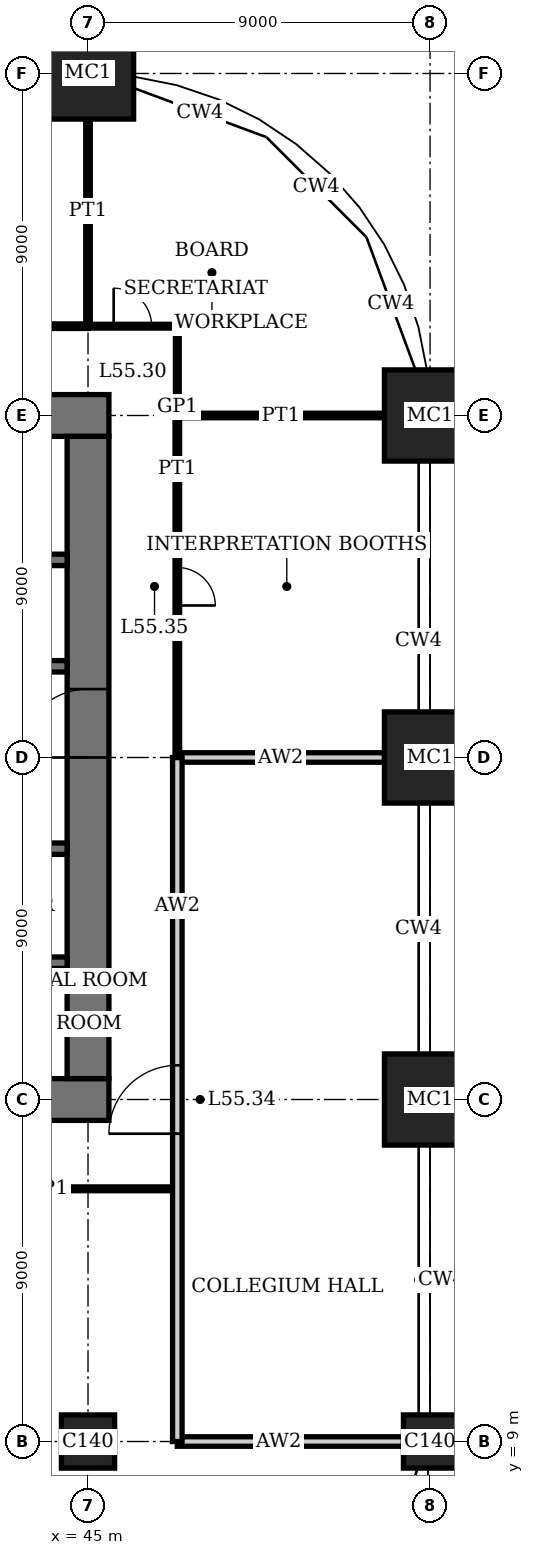
"""IFC4 building model, lengths in metres.
Left out: names, types, materials, properties, quantities, classifications, styles, units other than length and angle.
Written with IfcOpenShell. Run it as: python <this file> out.ifc"""

import sys

from ifc_helpers import new_model, si_unit, direction, frame, frame_2d, origin, origin_2d, place, context, subcontext, project, spatial, rectangle, extrude, element, fill, save


model = new_model("IFC4")
c1 = context("Model", 3, precision=1e-05, world=origin(), true_north=direction((0.0, 1.0)))
c2 = subcontext(c1, "Body", "Model", "MODEL_VIEW")
j1 = project(units=[si_unit("LENGTHUNIT", "METRE"), si_unit("PLANEANGLEUNIT", "RADIAN")], contexts=[c1])
p1 = place(None, origin())
s1 = spatial("IfcSite", under=j1, at=p1, CompositionType="ELEMENT")
p2 = place(p1, origin())
s2 = spatial("IfcBuilding", under=s1, at=p2, CompositionType="ELEMENT")
p3 = place(p2, frame((0.0, 0.0, 226.2)))
s3 = spatial("IfcBuildingStorey", under=s2, at=p3, CompositionType="ELEMENT", Elevation=226.2)
p4 = place(p3, frame((45.0, 9.0, 0.0), z_axis=(0.0, 0.0, 1.0), x_axis=(1.0, 0.0, 0.0)))
e1 = element("IfcColumn", 1, at=p4, inside=s3, PredefinedType="COLUMN", context=c2, shape_type="SweptSolid", body=[
    extrude(rectangle(XDim=1.4, YDim=1.4, at=origin_2d()), origin(), (0.0, 0.0, 1.0), 4.0),
])
p5 = place(p3, frame((45.0, 45.0, 0.0), z_axis=(0.0, 0.0, 1.0), x_axis=(1.0, 0.0, 0.0)))
e2 = element("IfcColumn", 2, at=p5, inside=s3, PredefinedType="COLUMN", context=c2, shape_type="SweptSolid", body=[
    extrude(rectangle(XDim=2.4, YDim=2.4, at=origin_2d()), origin(), (0.0, 0.0, 1.0), 4.0),
])
p6 = place(p3, frame((54.0, 9.0, 0.0), z_axis=(0.0, 0.0, 1.0), x_axis=(1.0, 0.0, 0.0)))
e3 = element("IfcColumn", 3, at=p6, inside=s3, PredefinedType="COLUMN", context=c2, shape_type="SweptSolid", body=[
    extrude(rectangle(XDim=1.4, YDim=1.4, at=origin_2d()), origin(), (0.0, 0.0, 1.0), 4.0),
])
for number, where, z_axis, x_axis in (
    (4, (54.0, 18.0, 0.0), (0.0, 0.0, 1.0), (1.0, 0.0, 0.0)),
    (5, (54.0, 27.0, 0.0), (0.0, 0.0, 1.0), (1.0, 0.0, 0.0)),
    (6, (54.0, 36.0, 0.0), (0.0, 0.0, 1.0), (1.0, 0.0, 0.0)),
):
    element("IfcColumn", number, at=place(p3, frame(where, z_axis=z_axis, x_axis=x_axis)), inside=s3, PredefinedType="COLUMN", context=c2, shape_type="SweptSolid", body=[
        extrude(rectangle(XDim=2.4, YDim=2.4, at=origin_2d()), origin(), (0.0, 0.0, 1.0), 4.0),
    ])
p7 = place(p3, frame((17.45, 18.0, 0.0), z_axis=(0.0, 0.0, 1.0), x_axis=(1.0, 0.0, 0.0)))
e7 = element("IfcWall", 7, at=p7, inside=s3, PredefinedType="SHEAR", context=c2, shape_type="SweptSolid", body=[
    extrude(rectangle(XDim=28.1, YDim=1.1, at=frame_2d((14.05, 0.0))), origin(), (0.0, 0.0, 1.0), 4.0),
])
p8 = place(p7, frame((11.55, 0.0, 0.0)))
e8 = element("IfcOpeningElement", 8, at=p8, cuts=e7, PredefinedType="OPENING", context=c2, shape_type="SweptSolid", body=[
    extrude(rectangle(XDim=1.0, YDim=2.4, at=frame_2d((0.5, 1.2))), frame((0.0, 0.56, 0.0), z_axis=(0.0, -1.0, 0.0), x_axis=(1.0, 0.0, 0.0)), (0.0, 0.0, 1.0), 1.12),
])
p9 = place(p7, frame((16.55, 0.0, 0.0)))
e9 = element("IfcOpeningElement", 9, at=p9, cuts=e7, PredefinedType="OPENING", context=c2, shape_type="SweptSolid", body=[
    extrude(rectangle(XDim=1.0, YDim=2.4, at=frame_2d((0.5, 1.2))), frame((0.0, 0.56, 0.0), z_axis=(0.0, -1.0, 0.0), x_axis=(1.0, 0.0, 0.0)), (0.0, 0.0, 1.0), 1.12),
])
p10 = place(p7, frame((20.0, 0.0, 0.0)))
e10 = element("IfcOpeningElement", 10, at=p10, cuts=e7, PredefinedType="OPENING", context=c2, shape_type="SweptSolid", body=[
    extrude(rectangle(XDim=1.1, YDim=2.4, at=frame_2d((0.55, 1.2))), frame((0.0, 0.56, 0.0), z_axis=(0.0, -1.0, 0.0), x_axis=(1.0, 0.0, 0.0)), (0.0, 0.0, 1.0), 1.12),
])
p11 = place(p7, frame((24.05, 0.0, 0.0)))
e11 = element("IfcOpeningElement", 11, at=p11, cuts=e7, PredefinedType="OPENING", context=c2, shape_type="SweptSolid", body=[
    extrude(rectangle(XDim=1.0, YDim=2.4, at=frame_2d((0.5, 1.2))), frame((0.0, 0.56, 0.0), z_axis=(0.0, -1.0, 0.0), x_axis=(1.0, 0.0, 0.0)), (0.0, 0.0, 1.0), 1.12),
])
p12 = place(p3, frame((45.55, 36.0, 0.0), z_axis=(0.0, 0.0, 1.0), x_axis=(-1.0, 0.0, 0.0)))
e12 = element("IfcWall", 12, at=p12, inside=s3, PredefinedType="SHEAR", context=c2, shape_type="SweptSolid", body=[
    extrude(rectangle(XDim=28.1, YDim=1.1, at=frame_2d((14.05, 0.0))), origin(), (0.0, 0.0, 1.0), 4.0),
])
p13 = place(p12, frame((11.55, 0.0, 0.0)))
e13 = element("IfcOpeningElement", 13, at=p13, cuts=e12, PredefinedType="OPENING", context=c2, shape_type="SweptSolid", body=[
    extrude(rectangle(XDim=1.0, YDim=2.4, at=frame_2d((0.5, 1.2))), frame((0.0, 0.56, 0.0), z_axis=(0.0, -1.0, 0.0), x_axis=(1.0, 0.0, 0.0)), (0.0, 0.0, 1.0), 1.12),
])
p14 = place(p12, frame((16.55, 0.0, 0.0)))
e14 = element("IfcOpeningElement", 14, at=p14, cuts=e12, PredefinedType="OPENING", context=c2, shape_type="SweptSolid", body=[
    extrude(rectangle(XDim=1.0, YDim=2.4, at=frame_2d((0.5, 1.2))), frame((0.0, 0.56, 0.0), z_axis=(0.0, -1.0, 0.0), x_axis=(1.0, 0.0, 0.0)), (0.0, 0.0, 1.0), 1.12),
])
p15 = place(p12, frame((20.0, 0.0, 0.0)))
e15 = element("IfcOpeningElement", 15, at=p15, cuts=e12, PredefinedType="OPENING", context=c2, shape_type="SweptSolid", body=[
    extrude(rectangle(XDim=1.1, YDim=2.4, at=frame_2d((0.55, 1.2))), frame((0.0, 0.56, 0.0), z_axis=(0.0, -1.0, 0.0), x_axis=(1.0, 0.0, 0.0)), (0.0, 0.0, 1.0), 1.12),
])
p16 = place(p12, frame((24.05, 0.0, 0.0)))
e16 = element("IfcOpeningElement", 16, at=p16, cuts=e12, PredefinedType="OPENING", context=c2, shape_type="SweptSolid", body=[
    extrude(rectangle(XDim=1.0, YDim=2.4, at=frame_2d((0.5, 1.2))), frame((0.0, 0.56, 0.0), z_axis=(0.0, -1.0, 0.0), x_axis=(1.0, 0.0, 0.0)), (0.0, 0.0, 1.0), 1.12),
])
p17 = place(p3, frame((45.0, 18.55, 0.0), z_axis=(0.0, 0.0, 1.0), x_axis=(0.0, 1.0, 0.0)))
e17 = element("IfcWall", 17, at=p17, inside=s3, PredefinedType="SHEAR", context=c2, shape_type="SweptSolid", body=[
    extrude(rectangle(XDim=16.9, YDim=1.1, at=frame_2d((8.45, 0.0))), origin(), (0.0, 0.0, 1.0), 4.0),
])
p18 = place(p17, frame((8.45, 0.0, 0.0)))
e18 = element("IfcOpeningElement", 18, at=p18, cuts=e17, PredefinedType="OPENING", context=c2, shape_type="SweptSolid", body=[
    extrude(rectangle(XDim=1.8, YDim=2.4, at=frame_2d((0.9, 1.2))), frame((0.0, 0.56, 0.0), z_axis=(0.0, -1.0, 0.0), x_axis=(1.0, 0.0, 0.0)), (0.0, 0.0, 1.0), 1.12),
])
p19 = place(p3, frame((36.15, 32.2, 0.0), z_axis=(0.0, 0.0, 1.0), x_axis=(1.0, 0.0, 0.0)))
e19 = element("IfcWall", 19, at=p19, inside=s3, PredefinedType="SHEAR", context=c2, shape_type="SweptSolid", body=[
    extrude(rectangle(XDim=8.3, YDim=0.3, at=frame_2d((4.15, 0.0))), origin(), (0.0, 0.0, 1.0), 4.0),
])
p20 = place(p19, frame((0.45, 0.0, 0.0)))
e20 = element("IfcOpeningElement", 20, at=p20, cuts=e19, PredefinedType="OPENING", context=c2, shape_type="SweptSolid", body=[
    extrude(rectangle(XDim=1.0, YDim=2.4, at=frame_2d((0.5, 1.2))), frame((0.0, 0.16, 0.0), z_axis=(0.0, -1.0, 0.0), x_axis=(1.0, 0.0, 0.0)), (0.0, 0.0, 1.0), 0.32),
])
p21 = place(p3, frame((18.55, 24.6, 0.0), z_axis=(0.0, 0.0, 1.0), x_axis=(1.0, 0.0, 0.0)))
e21 = element("IfcWall", 21, at=p21, inside=s3, PredefinedType="SHEAR", context=c2, shape_type="SweptSolid", body=[
    extrude(rectangle(XDim=25.9, YDim=0.3, at=frame_2d((12.95, 0.0))), origin(), (0.0, 0.0, 1.0), 4.0),
])
p22 = place(p21, frame((4.95, 0.0, 0.0)))
e22 = element("IfcOpeningElement", 22, at=p22, cuts=e21, PredefinedType="OPENING", context=c2, shape_type="SweptSolid", body=[
    extrude(rectangle(XDim=1.0, YDim=2.4, at=frame_2d((0.5, 1.2))), frame((0.0, 0.16, 0.0), z_axis=(0.0, -1.0, 0.0), x_axis=(1.0, 0.0, 0.0)), (0.0, 0.0, 1.0), 0.32),
])
p23 = place(p21, frame((24.5, 0.0, 0.0)))
e23 = element("IfcOpeningElement", 23, at=p23, cuts=e21, PredefinedType="OPENING", context=c2, shape_type="SweptSolid", body=[
    extrude(rectangle(XDim=0.9, YDim=2.1, at=frame_2d((0.45, 1.05))), frame((0.0, 0.16, 0.0), z_axis=(0.0, -1.0, 0.0), x_axis=(1.0, 0.0, 0.0)), (0.0, 0.0, 1.0), 0.32),
])
p24 = place(p21, frame((21.3, 0.0, 0.0)))
e24 = element("IfcOpeningElement", 24, at=p24, cuts=e21, PredefinedType="OPENING", context=c2, shape_type="SweptSolid", body=[
    extrude(rectangle(XDim=1.3, YDim=2.4, at=frame_2d((0.65, 1.2))), frame((0.0, 0.16, 0.0), z_axis=(0.0, -1.0, 0.0), x_axis=(1.0, 0.0, 0.0)), (0.0, 0.0, 1.0), 0.32),
])
p25 = place(p3, frame((18.55, 29.4, 0.0), z_axis=(0.0, 0.0, 1.0), x_axis=(1.0, 0.0, 0.0)))
e25 = element("IfcWall", 25, at=p25, inside=s3, PredefinedType="SHEAR", context=c2, shape_type="SweptSolid", body=[
    extrude(rectangle(XDim=25.9, YDim=0.3, at=frame_2d((12.95, 0.0))), origin(), (0.0, 0.0, 1.0), 4.0),
])
p26 = place(p25, frame((19.95, 0.0, 0.0)))
e26 = element("IfcOpeningElement", 26, at=p26, cuts=e25, PredefinedType="OPENING", context=c2, shape_type="SweptSolid", body=[
    extrude(rectangle(XDim=1.0, YDim=2.4, at=frame_2d((0.5, 1.2))), frame((0.0, 0.16, 0.0), z_axis=(0.0, -1.0, 0.0), x_axis=(1.0, 0.0, 0.0)), (0.0, 0.0, 1.0), 0.32),
])
p27 = place(p25, frame((0.5, 0.0, 0.0)))
e27 = element("IfcOpeningElement", 27, at=p27, cuts=e25, PredefinedType="OPENING", context=c2, shape_type="SweptSolid", body=[
    extrude(rectangle(XDim=0.9, YDim=2.1, at=frame_2d((0.45, 1.05))), frame((0.0, 0.16, 0.0), z_axis=(0.0, -1.0, 0.0), x_axis=(1.0, 0.0, 0.0)), (0.0, 0.0, 1.0), 0.32),
])
p28 = place(p25, frame((15.45, 0.0, 0.0)))
e28 = element("IfcOpeningElement", 28, at=p28, cuts=e25, PredefinedType="OPENING", context=c2, shape_type="SweptSolid", body=[
    extrude(rectangle(XDim=1.0, YDim=2.4, at=frame_2d((0.5, 1.2))), frame((0.0, 0.16, 0.0), z_axis=(0.0, -1.0, 0.0), x_axis=(1.0, 0.0, 0.0)), (0.0, 0.0, 1.0), 0.32),
])
p29 = place(p25, frame((12.45, 0.0, 0.0)))
e29 = element("IfcOpeningElement", 29, at=p29, cuts=e25, PredefinedType="OPENING", context=c2, shape_type="SweptSolid", body=[
    extrude(rectangle(XDim=1.0, YDim=2.4, at=frame_2d((0.5, 1.2))), frame((0.0, 0.16, 0.0), z_axis=(0.0, -1.0, 0.0), x_axis=(1.0, 0.0, 0.0)), (0.0, 0.0, 1.0), 0.32),
])
p30 = place(p25, frame((9.4, 0.0, 0.0)))
e30 = element("IfcOpeningElement", 30, at=p30, cuts=e25, PredefinedType="OPENING", context=c2, shape_type="SweptSolid", body=[
    extrude(rectangle(XDim=1.1, YDim=2.4, at=frame_2d((0.55, 1.2))), frame((0.0, 0.16, 0.0), z_axis=(0.0, -1.0, 0.0), x_axis=(1.0, 0.0, 0.0)), (0.0, 0.0, 1.0), 0.32),
])
p31 = place(p25, frame((6.4, 0.0, 0.0)))
e31 = element("IfcOpeningElement", 31, at=p31, cuts=e25, PredefinedType="OPENING", context=c2, shape_type="SweptSolid", body=[
    extrude(rectangle(XDim=1.1, YDim=2.4, at=frame_2d((0.55, 1.2))), frame((0.0, 0.16, 0.0), z_axis=(0.0, -1.0, 0.0), x_axis=(1.0, 0.0, 0.0)), (0.0, 0.0, 1.0), 0.32),
])
p32 = place(p25, frame((3.3, 0.0, 0.0)))
e32 = element("IfcOpeningElement", 32, at=p32, cuts=e25, PredefinedType="OPENING", context=c2, shape_type="SweptSolid", body=[
    extrude(rectangle(XDim=1.3, YDim=2.4, at=frame_2d((0.65, 1.2))), frame((0.0, 0.16, 0.0), z_axis=(0.0, -1.0, 0.0), x_axis=(1.0, 0.0, 0.0)), (0.0, 0.0, 1.0), 0.32),
])
p33 = place(p3, frame((27.15, 21.6, 0.0), z_axis=(0.0, 0.0, 1.0), x_axis=(1.0, 0.0, 0.0)))
e33 = element("IfcWall", 33, at=p33, inside=s3, PredefinedType="SHEAR", context=c2, shape_type="SweptSolid", body=[
    extrude(rectangle(XDim=17.3, YDim=0.3, at=frame_2d((8.65, 0.0))), origin(), (0.0, 0.0, 1.0), 4.0),
])
p34 = place(p3, frame((47.35, 9.0, 0.0), z_axis=(0.0, 0.0, 1.0), x_axis=(1.0, 0.0, 0.0)))
e34 = element("IfcWall", 34, at=p34, inside=s3, PredefinedType="PARTITIONING", context=c2, shape_type="SweptSolid", body=[
    extrude(rectangle(XDim=5.95, YDim=0.25, at=frame_2d((2.975, 0.0))), origin(), (0.0, 0.0, 1.0), 3.05),
])
p35 = place(p3, frame((31.5, 15.65, 0.0), z_axis=(0.0, 0.0, 1.0), x_axis=(1.0, 0.0, 0.0)))
e35 = element("IfcWall", 35, at=p35, inside=s3, PredefinedType="PARTITIONING", context=c2, shape_type="SweptSolid", body=[
    extrude(rectangle(XDim=15.85, YDim=0.1, at=frame_2d((7.925, 0.0))), origin(), (0.0, 0.0, 1.0), 3.75),
])
p36 = place(p35, frame((7.425, 0.0, 0.0)))
e36 = element("IfcOpeningElement", 36, at=p36, cuts=e35, PredefinedType="OPENING", context=c2, shape_type="SweptSolid", body=[
    extrude(rectangle(XDim=1.0, YDim=2.4, at=frame_2d((0.5, 1.2))), frame((0.0, 0.06, 0.0), z_axis=(0.0, -1.0, 0.0), x_axis=(1.0, 0.0, 0.0)), (0.0, 0.0, 1.0), 0.12),
])
p37 = place(p3, frame((47.35, 27.0, 0.0), z_axis=(0.0, 0.0, 1.0), x_axis=(1.0, 0.0, 0.0)))
e37 = element("IfcWall", 37, at=p37, inside=s3, PredefinedType="PARTITIONING", context=c2, shape_type="SweptSolid", body=[
    extrude(rectangle(XDim=5.45, YDim=0.25, at=frame_2d((2.725, 0.0))), origin(), (0.0, 0.0, 1.0), 3.05),
])
p38 = place(p3, frame((47.35, 36.0, 0.0), z_axis=(0.0, 0.0, 1.0), x_axis=(1.0, 0.0, 0.0)))
e38 = element("IfcWall", 38, at=p38, inside=s3, PredefinedType="PARTITIONING", context=c2, shape_type="SweptSolid", body=[
    extrude(rectangle(XDim=5.45, YDim=0.12, at=frame_2d((2.725, 0.0))), origin(), (0.0, 0.0, 1.0), 3.05),
])
p39 = place(p3, frame((36.0, 38.35, 0.0), z_axis=(0.0, 0.0, 1.0), x_axis=(1.0, 0.0, 0.0)))
e39 = element("IfcWall", 39, at=p39, inside=s3, PredefinedType="PARTITIONING", context=c2, shape_type="SweptSolid", body=[
    extrude(rectangle(XDim=9.0, YDim=0.12, at=frame_2d((4.5, 0.0))), origin(), (0.0, 0.0, 1.0), 3.75),
])
p40 = place(p39, frame((4.0, 0.0, 0.0)))
e40 = element("IfcOpeningElement", 40, at=p40, cuts=e39, PredefinedType="OPENING", context=c2, shape_type="SweptSolid", body=[
    extrude(rectangle(XDim=1.0, YDim=2.4, at=frame_2d((0.5, 1.2))), frame((0.0, 0.07, 0.0), z_axis=(0.0, -1.0, 0.0), x_axis=(1.0, 0.0, 0.0)), (0.0, 0.0, 1.0), 0.14),
])
p41 = place(p3, frame((45.0, 38.35, 0.0), z_axis=(0.0, 0.0, 1.0), x_axis=(1.0, 0.0, 0.0)))
e41 = element("IfcWall", 41, at=p41, inside=s3, PredefinedType="PARTITIONING", context=c2, shape_type="SweptSolid", body=[
    extrude(rectangle(XDim=2.35, YDim=0.1, at=frame_2d((1.175, 0.0))), origin(), (0.0, 0.0, 1.0), 3.75),
])
p42 = place(p41, frame((0.675, 0.0, 0.0)))
e42 = element("IfcOpeningElement", 42, at=p42, cuts=e41, PredefinedType="OPENING", context=c2, shape_type="SweptSolid", body=[
    extrude(rectangle(XDim=1.0, YDim=2.4, at=frame_2d((0.5, 1.2))), frame((0.0, 0.06, 0.0), z_axis=(0.0, -1.0, 0.0), x_axis=(1.0, 0.0, 0.0)), (0.0, 0.0, 1.0), 0.12),
])
p43 = place(p3, frame((45.0, 38.35, 0.0), z_axis=(0.0, 0.0, 1.0), x_axis=(0.0, 1.0, 0.0)))
e43 = element("IfcWall", 43, at=p43, inside=s3, PredefinedType="PARTITIONING", context=c2, shape_type="SweptSolid", body=[
    extrude(rectangle(XDim=5.45, YDim=0.12, at=frame_2d((2.725, 0.0))), origin(), (0.0, 0.0, 1.0), 3.05),
])
p44 = place(p3, frame((47.35, 9.0, 0.0), z_axis=(0.0, 0.0, 1.0), x_axis=(0.0, 1.0, 0.0)))
e44 = element("IfcWall", 44, at=p44, inside=s3, PredefinedType="PARTITIONING", context=c2, shape_type="SweptSolid", body=[
    extrude(rectangle(XDim=18.0, YDim=0.25, at=frame_2d((9.0, 0.0))), origin(), (0.0, 0.0, 1.0), 3.75),
])
p45 = place(p44, frame((8.1, 0.0, 0.0)))
e45 = element("IfcOpeningElement", 45, at=p45, cuts=e44, PredefinedType="OPENING", context=c2, shape_type="SweptSolid", body=[
    extrude(rectangle(XDim=1.8, YDim=2.4, at=frame_2d((0.9, 1.2))), frame((0.0, 0.135, 0.0), z_axis=(0.0, -1.0, 0.0), x_axis=(1.0, 0.0, 0.0)), (0.0, 0.0, 1.0), 0.27),
])
p46 = place(p3, frame((47.35, 27.0, 0.0), z_axis=(0.0, 0.0, 1.0), x_axis=(0.0, 1.0, 0.0)))
e46 = element("IfcWall", 46, at=p46, inside=s3, PredefinedType="PARTITIONING", context=c2, shape_type="SweptSolid", body=[
    extrude(rectangle(XDim=9.0, YDim=0.12, at=frame_2d((4.5, 0.0))), origin(), (0.0, 0.0, 1.0), 3.75),
])
p47 = place(p46, frame((4.0, 0.0, 0.0)))
e47 = element("IfcOpeningElement", 47, at=p47, cuts=e46, PredefinedType="OPENING", context=c2, shape_type="SweptSolid", body=[
    extrude(rectangle(XDim=1.0, YDim=2.4, at=frame_2d((0.5, 1.2))), frame((0.0, 0.07, 0.0), z_axis=(0.0, -1.0, 0.0), x_axis=(1.0, 0.0, 0.0)), (0.0, 0.0, 1.0), 0.14),
])
p48 = place(p3, frame((47.35, 36.0, 0.0), z_axis=(0.0, 0.0, 1.0), x_axis=(0.0, 1.0, 0.0)))
e48 = element("IfcWall", 48, at=p48, inside=s3, PredefinedType="PARTITIONING", context=c2, shape_type="SweptSolid", body=[
    extrude(rectangle(XDim=2.35, YDim=0.1, at=frame_2d((1.175, 0.0))), origin(), (0.0, 0.0, 1.0), 3.75),
])
p49 = place(p18, origin())
e49 = element("IfcDoor", 49, at=p49, inside=s3, OperationType="DOUBLE_DOOR_DOUBLE_SWING", PredefinedType="DOOR", context=c2, shape_type="SweptSolid", body=[
    extrude(rectangle(XDim=1.8, YDim=2.4, at=frame_2d((0.9, 1.2))), frame((0.0, 0.03, 0.0), z_axis=(0.0, -1.0, 0.0), x_axis=(1.0, 0.0, 0.0)), (0.0, 0.0, 1.0), 0.06),
    extrude(rectangle(XDim=0.04, YDim=2.4, at=frame_2d((0.02, 1.2))), frame((0.0, 0.55, 0.0), z_axis=(0.0, -1.0, 0.0), x_axis=(1.0, 0.0, 0.0)), (0.0, 0.0, 1.0), 1.1),
    extrude(rectangle(XDim=0.04, YDim=2.4, at=frame_2d((1.78, 1.2))), frame((0.0, 0.55, 0.0), z_axis=(0.0, -1.0, 0.0), x_axis=(1.0, 0.0, 0.0)), (0.0, 0.0, 1.0), 1.1),
    extrude(rectangle(XDim=1.8, YDim=0.04, at=frame_2d((0.9, 2.38))), frame((0.0, 0.55, 0.0), z_axis=(0.0, -1.0, 0.0), x_axis=(1.0, 0.0, 0.0)), (0.0, 0.0, 1.0), 1.1),
])
fill(e18, e49)
p50 = place(p42, origin())
e50 = element("IfcDoor", 50, at=p50, inside=s3, OperationType="SINGLE_SWING_RIGHT", PredefinedType="DOOR", context=c2, shape_type="SweptSolid", body=[
    extrude(rectangle(XDim=1.0, YDim=2.4, at=frame_2d((0.5, 1.2))), frame((0.0, 0.02, 0.0), z_axis=(0.0, -1.0, 0.0), x_axis=(1.0, 0.0, 0.0)), (0.0, 0.0, 1.0), 0.04),
])
fill(e42, e50)
p51 = place(p45, origin())
e51 = element("IfcDoor", 51, at=p51, inside=s3, OperationType="DOUBLE_DOOR_SINGLE_SWING", PredefinedType="DOOR", context=c2, shape_type="SweptSolid", body=[
    extrude(rectangle(XDim=1.8, YDim=2.4, at=frame_2d((0.9, 1.2))), frame((0.0, 0.025, 0.0), z_axis=(0.0, -1.0, 0.0), x_axis=(1.0, 0.0, 0.0)), (0.0, 0.0, 1.0), 0.05),
])
fill(e45, e51)
p52 = place(p47, origin())
e52 = element("IfcDoor", 52, at=p52, inside=s3, OperationType="SINGLE_SWING_LEFT", PredefinedType="DOOR", context=c2, shape_type="SweptSolid", body=[
    extrude(rectangle(XDim=1.0, YDim=2.4, at=frame_2d((0.5, 1.2))), frame((0.0, 0.025, 0.0), z_axis=(0.0, -1.0, 0.0), x_axis=(1.0, 0.0, 0.0)), (0.0, 0.0, 1.0), 0.05),
])
fill(e47, e52)
save(model, sys.argv[1])
